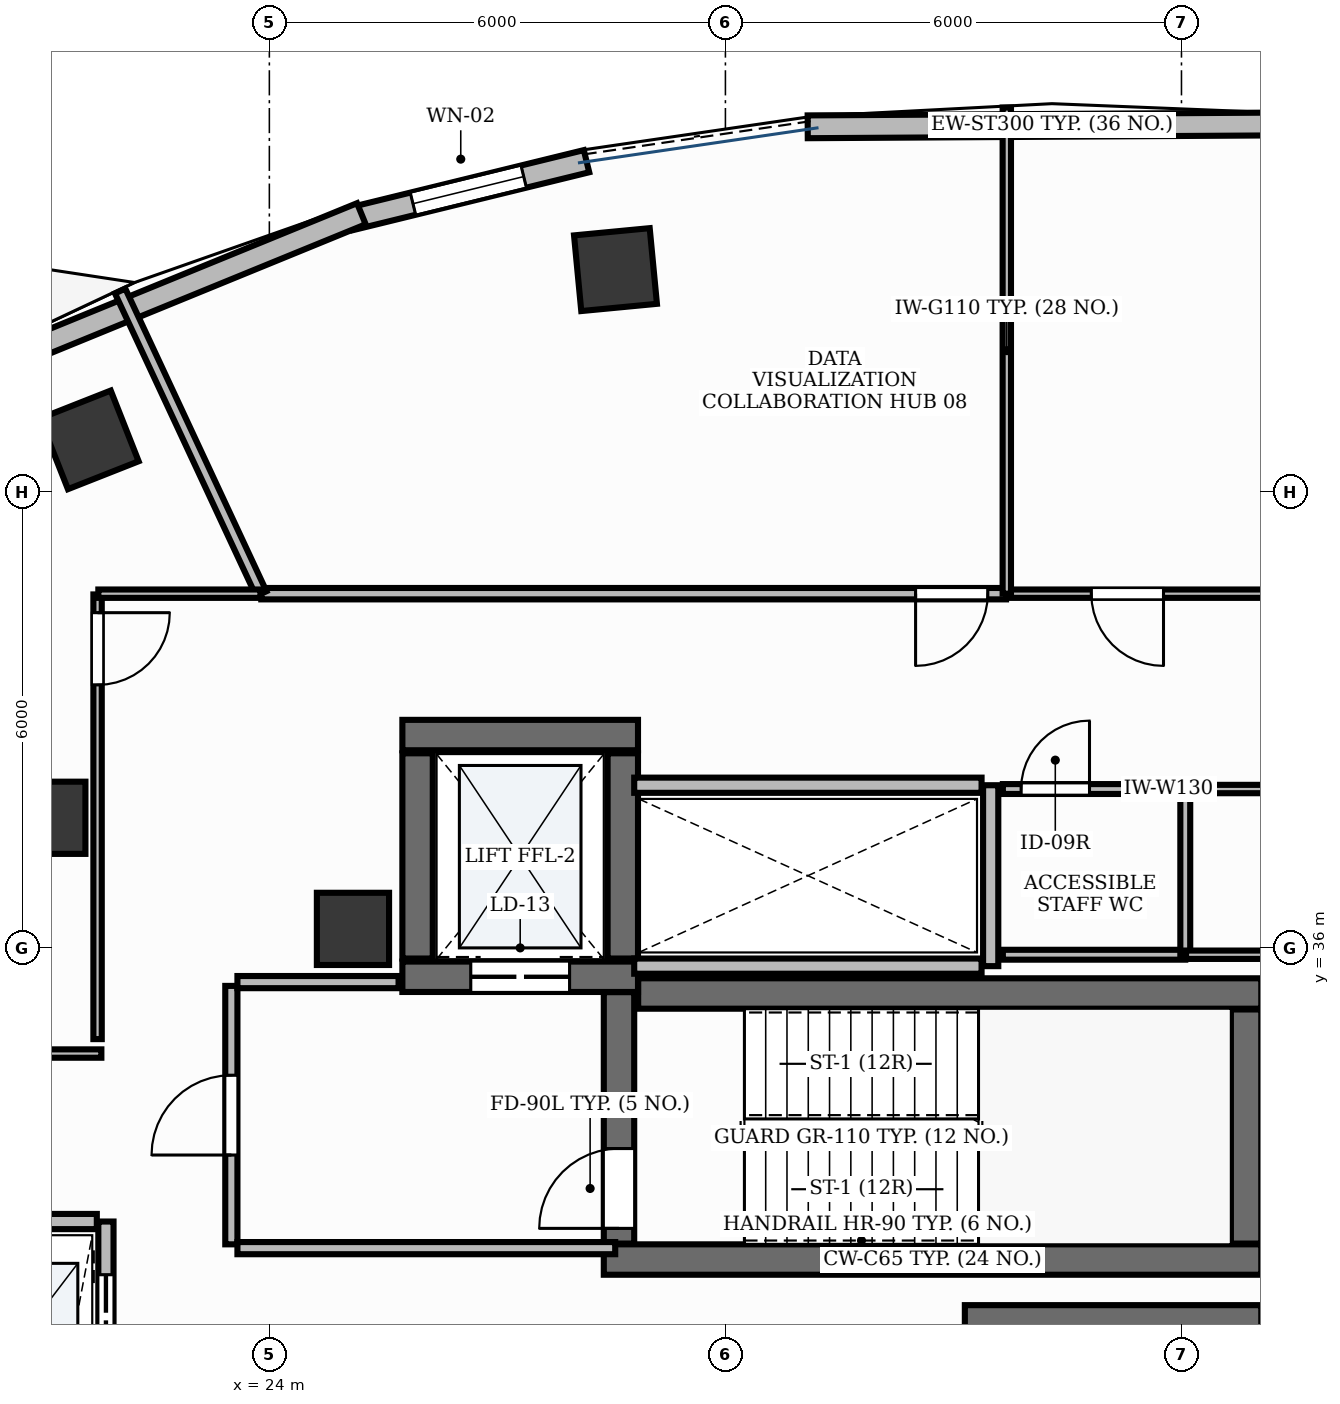
"""IFC4 building model, lengths in metres.
Left out: names, types, materials, properties, quantities, classifications, styles, units other than length and angle.
Written with IfcOpenShell. Run it as: python <this file> out.ifc"""

import sys

from ifc_helpers import new_model, si_unit, direction, frame, frame_2d, origin, origin_2d, place, context, subcontext, project, spatial, rectangle, extrude, element, fill, save


model = new_model("IFC4")
c1 = context("Model", 3, precision=1e-05, world=origin(), true_north=direction((0.0, 1.0)))
c2 = subcontext(c1, "Body", "Model", "MODEL_VIEW")
j1 = project(units=[si_unit("LENGTHUNIT", "METRE"), si_unit("PLANEANGLEUNIT", "RADIAN")], contexts=[c1])
p1 = place(None, origin())
s1 = spatial("IfcSite", under=j1, at=p1, CompositionType="ELEMENT")
p2 = place(p1, origin())
s2 = spatial("IfcBuilding", under=s1, at=p2, CompositionType="ELEMENT")
p3 = place(p2, frame((0.0, 0.0, 208.8)))
s3 = spatial("IfcBuildingStorey", under=s2, at=p3, CompositionType="ELEMENT", Elevation=208.8)
p4 = place(p3, frame((28.852, 35.4, 0.0), z_axis=(0.0, 0.0, 1.0), x_axis=(1.0, 0.0, 0.0)))
e1 = element("IfcWall", 1, at=p4, inside=s3, PredefinedType="SHEAR", context=c2, shape_type="SweptSolid", body=[
    extrude(rectangle(XDim=8.198, YDim=0.4, at=frame_2d((4.099, 0.0))), origin(), (0.0, 0.0, 1.0), 3.88),
])
p5 = place(p3, frame((28.4, 31.9, 0.0), z_axis=(0.0, 0.0, 1.0), x_axis=(1.0, 0.0, 0.0)))
e2 = element("IfcWall", 2, at=p5, inside=s3, PredefinedType="SHEAR", context=c2, shape_type="SweptSolid", body=[
    extrude(rectangle(XDim=8.65, YDim=0.4, at=frame_2d((4.325, 0.0))), origin(), (0.0, 0.0, 1.0), 3.88),
])
p6 = place(p3, frame((36.85, 32.11, 0.0), z_axis=(0.0, 0.0, 1.0), x_axis=(0.0, 1.0, 0.0)))
e3 = element("IfcWall", 3, at=p6, inside=s3, PredefinedType="SHEAR", context=c2, shape_type="SweptSolid", body=[
    extrude(rectangle(XDim=3.08, YDim=0.4, at=frame_2d((1.54, 0.0))), origin(), (0.0, 0.0, 1.0), 3.88),
])
p7 = place(p3, frame((28.6, 32.11, 0.0), z_axis=(0.0, 0.0, 1.0), x_axis=(0.0, 1.0, 0.0)))
e4 = element("IfcWall", 4, at=p7, inside=s3, PredefinedType="SHEAR", context=c2, shape_type="SweptSolid", body=[
    extrude(rectangle(XDim=3.308, YDim=0.4, at=frame_2d((1.654, 0.0))), origin(), (0.0, 0.0, 1.0), 3.88),
])
p8 = place(p7, frame((0.2, 0.0, 0.0)))
e5 = element("IfcOpeningElement", 5, at=p8, cuts=e4, PredefinedType="OPENING", context=c2, shape_type="SweptSolid", body=[
    extrude(rectangle(XDim=1.05, YDim=2.15, at=frame_2d((0.525, 1.075))), frame((0.0, 0.215, 0.0), z_axis=(0.0, -1.0, 0.0), x_axis=(1.0, 0.0, 0.0)), (0.0, 0.0, 1.0), 0.43),
])
p9 = place(p3, frame((33.15, 31.1, 0.0), z_axis=(0.0, 0.0, 1.0), x_axis=(1.0, 0.0, 0.0)))
e6 = element("IfcWall", 6, at=p9, inside=s3, PredefinedType="SHEAR", context=c2, shape_type="SweptSolid", body=[
    extrude(rectangle(XDim=3.9, YDim=0.4, at=frame_2d((1.95, 0.0))), origin(), (0.0, 0.0, 1.0), 3.88),
])
p10 = place(p3, frame((25.75, 38.8, 0.0), z_axis=(0.0, 0.0, 1.0), x_axis=(1.0, 0.0, 0.0)))
e7 = element("IfcWall", 7, at=p10, inside=s3, PredefinedType="SHEAR", context=c2, shape_type="SweptSolid", body=[
    extrude(rectangle(XDim=3.1, YDim=0.4, at=frame_2d((1.55, 0.0))), origin(), (0.0, 0.0, 1.0), 3.88),
])
p11 = place(p3, frame((25.75, 35.62, 0.0), z_axis=(0.0, 0.0, 1.0), x_axis=(1.0, 0.0, 0.0)))
e8 = element("IfcWall", 8, at=p11, inside=s3, PredefinedType="SHEAR", context=c2, shape_type="SweptSolid", body=[
    extrude(rectangle(XDim=3.1, YDim=0.4, at=frame_2d((1.55, 0.0))), origin(), (0.0, 0.0, 1.0), 3.88),
])
p12 = place(p11, frame((0.9, 0.0, 0.0)))
e9 = element("IfcOpeningElement", 9, at=p12, cuts=e8, PredefinedType="OPENING", context=c2, shape_type="SweptSolid", body=[
    extrude(rectangle(XDim=1.3, YDim=2.2, at=frame_2d((0.65, 1.1))), frame((0.0, 0.215, 0.0), z_axis=(0.0, -1.0, 0.0), x_axis=(1.0, 0.0, 0.0)), (0.0, 0.0, 1.0), 0.43),
])
for number, where, z_axis, x_axis in (
    (10, (25.95, 35.86, 0.0), (0.0, 0.0, 1.0), (0.0, 1.0, 0.0)),
    (11, (28.65, 35.86, 0.0), (0.0, 0.0, 1.0), (0.0, 1.0, 0.0)),
):
    element("IfcWall", number, at=place(p3, frame(where, z_axis=z_axis, x_axis=x_axis)), inside=s3, PredefinedType="SHEAR", context=c2, shape_type="SweptSolid", body=[
        extrude(rectangle(XDim=2.7, YDim=0.4, at=frame_2d((1.35, 0.0))), origin(), (0.0, 0.0, 1.0), 3.88),
    ])
p13 = place(p3, frame((25.1, 36.25, -0.0), z_axis=(0.0, 0.0, 1.0), x_axis=(1.0, 0.0, 0.0)))
e12 = element("IfcColumn", 12, at=p13, inside=s3, PredefinedType="PILASTER", context=c2, shape_type="SweptSolid", body=[
    extrude(rectangle(XDim=0.95, YDim=0.95, at=origin_2d()), origin(), (0.0, 0.0, 1.0), 3.881),
])
for number, where, z_axis, x_axis in (
    (13, (28.554, 44.924, -0.0), (0.0, 0.0, 1.0), (0.995, 0.095, 0.0)),
    (14, (21.632, 42.684, -0.0), (0.0, 0.0, 1.0), (0.93, 0.367, 0.0)),
):
    element("IfcColumn", number, at=place(p3, frame(where, z_axis=z_axis, x_axis=x_axis)), inside=s3, PredefinedType="COLUMN", context=c2, shape_type="SweptSolid", body=[
        extrude(rectangle(XDim=1.0, YDim=1.0, at=origin_2d()), origin(), (0.0, 0.0, 1.0), 3.881),
    ])
p14 = place(p3, frame((21.105, 37.712, -0.0), z_axis=(0.0, 0.0, 1.0), x_axis=(1.0, 0.0, 0.0)))
e15 = element("IfcColumn", 15, at=p14, inside=s3, PredefinedType="COLUMN", context=c2, shape_type="SweptSolid", body=[
    extrude(rectangle(XDim=0.95, YDim=0.95, at=origin_2d()), origin(), (0.0, 0.0, 1.0), 3.881),
])
p15 = place(p3, frame((28.173, 46.35, 0.0), z_axis=(0.0, 0.0, 1.0), x_axis=(-0.971262421812, -0.238011150948, 0.0)))
e16 = element("IfcWall", 16, at=p15, inside=s3, PredefinedType="STANDARD", context=c2, shape_type="SweptSolid", body=[
    extrude(rectangle(XDim=3.201, YDim=0.3, at=frame_2d((1.601, 0.0))), origin(), (0.0, 0.0, 1.0), 3.88),
])
p16 = place(p15, frame((0.851, 0.0, 0.95)))
e17 = element("IfcOpeningElement", 17, at=p16, cuts=e16, PredefinedType="OPENING", context=c2, shape_type="SweptSolid", body=[
    extrude(rectangle(XDim=1.5, YDim=1.8, at=frame_2d((0.75, 0.9))), frame((0.0, 0.165, 0.0), z_axis=(0.0, -1.0, 0.0), x_axis=(1.0, 0.0, 0.0)), (0.0, 0.0, 1.0), 0.33),
])
p17 = place(p3, frame((37.513, 46.841, 0.0), z_axis=(0.0, 0.0, 1.0), x_axis=(-0.999982235247, -0.005960636734, 0.0)))
e18 = element("IfcWall", 18, at=p17, inside=s3, PredefinedType="STANDARD", context=c2, shape_type="SweptSolid", body=[
    extrude(rectangle(XDim=6.43, YDim=0.3, at=frame_2d((3.215, 0.0))), origin(), (0.0, 0.0, 1.0), 3.88),
])
p18 = place(p3, frame((25.21, 45.658, 0.0), z_axis=(0.0, 0.0, 1.0), x_axis=(-0.925564684887, -0.37858950605, 0.0)))
e19 = element("IfcWall", 19, at=p18, inside=s3, PredefinedType="STANDARD", context=c2, shape_type="SweptSolid", body=[
    extrude(rectangle(XDim=6.142, YDim=0.3, at=frame_2d((3.071, 0.0))), origin(), (0.0, 0.0, 1.0), 2.205),
])
p19 = place(p3, frame((21.85, 21.6, 0.0), z_axis=(0.0, 0.0, 1.0), x_axis=(0.0, 1.0, 0.0)))
e20 = element("IfcWall", 20, at=p19, inside=s3, PredefinedType="PARTITIONING", context=c2, shape_type="SweptSolid", body=[
    extrude(rectangle(XDim=10.8, YDim=0.2, at=frame_2d((5.4, 0.0))), origin(), (0.0, 0.0, 1.0), 2.22),
])
p20 = place(p19, frame((0.9, 0.0, 0.0)))
e21 = element("IfcOpeningElement", 21, at=p20, cuts=e20, PredefinedType="OPENING", context=c2, shape_type="SweptSolid", body=[
    extrude(rectangle(XDim=1.1, YDim=2.2, at=frame_2d((0.55, 1.1))), frame((0.0, 0.115, 0.0), z_axis=(0.0, -1.0, 0.0), x_axis=(1.0, 0.0, 0.0)), (0.0, 0.0, 1.0), 0.23),
])
p21 = place(p19, frame((3.6, 0.0, 0.0)))
e22 = element("IfcOpeningElement", 22, at=p21, cuts=e20, PredefinedType="OPENING", context=c2, shape_type="SweptSolid", body=[
    extrude(rectangle(XDim=1.1, YDim=2.2, at=frame_2d((0.55, 1.1))), frame((0.0, 0.115, 0.0), z_axis=(0.0, -1.0, 0.0), x_axis=(1.0, 0.0, 0.0)), (0.0, 0.0, 1.0), 0.23),
])
p22 = place(p19, frame((6.3, 0.0, 0.0)))
e23 = element("IfcOpeningElement", 23, at=p22, cuts=e20, PredefinedType="OPENING", context=c2, shape_type="SweptSolid", body=[
    extrude(rectangle(XDim=1.1, YDim=2.2, at=frame_2d((0.55, 1.1))), frame((0.0, 0.115, 0.0), z_axis=(0.0, -1.0, 0.0), x_axis=(1.0, 0.0, 0.0)), (0.0, 0.0, 1.0), 0.23),
])
p23 = place(p19, frame((9.0, 0.0, 0.0)))
e24 = element("IfcOpeningElement", 24, at=p23, cuts=e20, PredefinedType="OPENING", context=c2, shape_type="SweptSolid", body=[
    extrude(rectangle(XDim=1.1, YDim=2.2, at=frame_2d((0.55, 1.1))), frame((0.0, 0.115, 0.0), z_axis=(0.0, -1.0, 0.0), x_axis=(1.0, 0.0, 0.0)), (0.0, 0.0, 1.0), 0.23),
])
p24 = place(p3, frame((19.62, 32.4, 0.0), z_axis=(0.0, 0.0, 1.0), x_axis=(1.0, 0.0, 0.0)))
e25 = element("IfcWall", 25, at=p24, inside=s3, PredefinedType="PARTITIONING", context=c2, shape_type="SweptSolid", body=[
    extrude(rectangle(XDim=2.11, YDim=0.2, at=frame_2d((1.055, 0.0))), origin(), (0.0, 0.0, 1.0), 2.22),
])
p25 = place(p3, frame((33.49, 35.76, 0.0), z_axis=(0.0, 0.0, 1.0), x_axis=(0.0, 1.0, 0.0)))
e26 = element("IfcWall", 26, at=p25, inside=s3, PredefinedType="PARTITIONING", context=c2, shape_type="SweptSolid", body=[
    extrude(rectangle(XDim=2.38, YDim=0.2, at=frame_2d((1.19, 0.0))), origin(), (0.0, 0.0, 1.0), 2.22),
])
for number, where, z_axis, x_axis in (
    (27, (28.8, 35.76, 0.0), (0.0, 0.0, 1.0), (1.0, 0.0, 0.0)),
    (28, (28.8, 38.14, 0.0), (0.0, 0.0, 1.0), (1.0, 0.0, 0.0)),
):
    element("IfcWall", number, at=place(p3, frame(where, z_axis=z_axis, x_axis=x_axis)), inside=s3, PredefinedType="PARTITIONING", context=c2, shape_type="SweptSolid", body=[
        extrude(rectangle(XDim=4.57, YDim=0.2, at=frame_2d((2.285, 0.0))), origin(), (0.0, 0.0, 1.0), 2.22),
    ])
p26 = place(p3, frame((23.5, 32.1, 0.0), z_axis=(0.0, 0.0, 1.0), x_axis=(0.0, 1.0, 0.0)))
e29 = element("IfcWall", 29, at=p26, inside=s3, PredefinedType="PARTITIONING", context=c2, shape_type="SweptSolid", body=[
    extrude(rectangle(XDim=3.4, YDim=0.16, at=frame_2d((1.7, 0.0))), origin(), (0.0, 0.0, 1.0), 2.22),
])
p27 = place(p26, frame((1.175, 0.0, 0.0)))
e30 = element("IfcOpeningElement", 30, at=p27, cuts=e29, PredefinedType="OPENING", context=c2, shape_type="SweptSolid", body=[
    extrude(rectangle(XDim=1.05, YDim=2.15, at=frame_2d((0.525, 1.075))), frame((0.0, 0.095, 0.0), z_axis=(0.0, -1.0, 0.0), x_axis=(1.0, 0.0, 0.0)), (0.0, 0.0, 1.0), 0.19),
])
p28 = place(p3, frame((23.58, 32.05, 0.0), z_axis=(0.0, 0.0, 1.0), x_axis=(1.0, 0.0, 0.0)))
e31 = element("IfcWall", 31, at=p28, inside=s3, PredefinedType="PARTITIONING", context=c2, shape_type="SweptSolid", body=[
    extrude(rectangle(XDim=4.97, YDim=0.16, at=frame_2d((2.485, 0.0))), origin(), (0.0, 0.0, 1.0), 2.22),
])
p29 = place(p3, frame((23.58, 35.55, 0.0), z_axis=(0.0, 0.0, 1.0), x_axis=(1.0, 0.0, 0.0)))
e32 = element("IfcWall", 32, at=p29, inside=s3, PredefinedType="PARTITIONING", context=c2, shape_type="SweptSolid", body=[
    extrude(rectangle(XDim=2.12, YDim=0.16, at=frame_2d((1.06, 0.0))), origin(), (0.0, 0.0, 1.0), 2.22),
])
p30 = place(p3, frame((33.65, 38.09, 0.0), z_axis=(0.0, 0.0, 1.0), x_axis=(1.0, 0.0, 0.0)))
e33 = element("IfcWall", 33, at=p30, inside=s3, PredefinedType="PARTITIONING", context=c2, shape_type="SweptSolid", body=[
    extrude(rectangle(XDim=2.4, YDim=0.13, at=frame_2d((1.2, 0.0))), origin(), (0.0, 0.0, 1.0), 2.22),
])
p31 = place(p30, frame((0.24, 0.0, 0.0)))
e34 = element("IfcOpeningElement", 34, at=p31, cuts=e33, PredefinedType="OPENING", context=c2, shape_type="SweptSolid", body=[
    extrude(rectangle(XDim=0.9, YDim=2.15, at=frame_2d((0.45, 1.075))), frame((0.0, 0.08, 0.0), z_axis=(0.0, -1.0, 0.0), x_axis=(1.0, 0.0, 0.0)), (0.0, 0.0, 1.0), 0.16),
])
p32 = place(p3, frame((37.2, 40.66, 0.0), z_axis=(0.0, 0.0, 1.0), x_axis=(-1.0, 0.0, 0.0)))
e35 = element("IfcWall", 35, at=p32, inside=s3, PredefinedType="MOVABLE", context=c2, shape_type="SweptSolid", body=[
    extrude(rectangle(XDim=3.498, YDim=0.11, at=frame_2d((1.749, 0.0))), origin(), (0.0, 0.0, 1.0), 2.22),
])
p33 = place(p32, frame((1.436, 0.0, 0.0)))
e36 = element("IfcOpeningElement", 36, at=p33, cuts=e35, PredefinedType="OPENING", context=c2, shape_type="SweptSolid", body=[
    extrude(rectangle(XDim=0.95, YDim=2.15, at=frame_2d((0.475, 1.075))), frame((0.0, 0.07, 0.0), z_axis=(0.0, -1.0, 0.0), x_axis=(1.0, 0.0, 0.0)), (0.0, 0.0, 1.0), 0.14),
])
p34 = place(p3, frame((33.692, 40.66, 0.0), z_axis=(0.0, 0.0, 1.0), x_axis=(-1.0, 0.0, 0.0)))
e37 = element("IfcWall", 37, at=p34, inside=s3, PredefinedType="PARTITIONING", context=c2, shape_type="SweptSolid", body=[
    extrude(rectangle(XDim=9.798, YDim=0.15, at=frame_2d((4.899, 0.0))), origin(), (0.0, 0.0, 1.0), 2.22),
])
p35 = place(p34, frame((0.24, 0.0, 0.0)))
e38 = element("IfcOpeningElement", 38, at=p35, cuts=e37, PredefinedType="OPENING", context=c2, shape_type="SweptSolid", body=[
    extrude(rectangle(XDim=0.95, YDim=2.15, at=frame_2d((0.475, 1.075))), frame((0.0, 0.09, 0.0), z_axis=(0.0, -1.0, 0.0), x_axis=(1.0, 0.0, 0.0)), (0.0, 0.0, 1.0), 0.18),
])
p36 = place(p3, frame((21.74, 40.65, 0.0), z_axis=(0.0, 0.0, 1.0), x_axis=(0.0, -1.0, 0.0)))
e39 = element("IfcWall", 39, at=p36, inside=s3, PredefinedType="MOVABLE", context=c2, shape_type="SweptSolid", body=[
    extrude(rectangle(XDim=5.85, YDim=0.11, at=frame_2d((2.925, 0.0))), origin(), (0.0, 0.0, 1.0), 2.22),
])
p37 = place(p36, frame((0.24, 0.0, 0.0)))
e40 = element("IfcOpeningElement", 40, at=p37, cuts=e39, PredefinedType="OPENING", context=c2, shape_type="SweptSolid", body=[
    extrude(rectangle(XDim=0.95, YDim=2.15, at=frame_2d((0.475, 1.075))), frame((0.0, 0.07, 0.0), z_axis=(0.0, -1.0, 0.0), x_axis=(1.0, 0.0, 0.0)), (0.0, 0.0, 1.0), 0.14),
])
p38 = place(p3, frame((36.05, 35.91, 0.0), z_axis=(0.0, 0.0, 1.0), x_axis=(-1.0, 0.0, 0.0)))
e41 = element("IfcWall", 41, at=p38, inside=s3, PredefinedType="PARTITIONING", context=c2, shape_type="SweptSolid", body=[
    extrude(rectangle(XDim=2.4, YDim=0.13, at=frame_2d((1.2, 0.0))), origin(), (0.0, 0.0, 1.0), 2.22),
])
p39 = place(p3, frame((36.05, 38.09, 0.0), z_axis=(0.0, 0.0, 1.0), x_axis=(0.0, -1.0, 0.0)))
e42 = element("IfcWall", 42, at=p39, inside=s3, PredefinedType="PARTITIONING", context=c2, shape_type="SweptSolid", body=[
    extrude(rectangle(XDim=2.18, YDim=0.13, at=frame_2d((1.09, 0.0))), origin(), (0.0, 0.0, 1.0), 2.22),
])
p40 = place(p3, frame((37.35, 35.91, 0.0), z_axis=(0.0, 0.0, 1.0), x_axis=(-1.0, 0.0, 0.0)))
e43 = element("IfcWall", 43, at=p40, inside=s3, PredefinedType="MOVABLE", context=c2, shape_type="SweptSolid", body=[
    extrude(rectangle(XDim=1.29, YDim=0.11, at=frame_2d((0.645, 0.0))), origin(), (0.0, 0.0, 1.0), 2.22),
])
p41 = place(p3, frame((36.06, 38.09, 0.0), z_axis=(0.0, 0.0, 1.0), x_axis=(1.0, 0.0, 0.0)))
e44 = element("IfcWall", 44, at=p41, inside=s3, PredefinedType="MOVABLE", context=c2, shape_type="SweptSolid", body=[
    extrude(rectangle(XDim=1.14, YDim=0.11, at=frame_2d((0.57, 0.0))), origin(), (0.0, 0.0, 1.0), 2.22),
])
p42 = place(p3, frame((33.702, 40.66, 0.0), z_axis=(0.0, 0.0, 1.0), x_axis=(0.0, 1.0, 0.0)))
e45 = element("IfcWall", 45, at=p42, inside=s3, PredefinedType="MOVABLE", context=c2, shape_type="SweptSolid", body=[
    extrude(rectangle(XDim=6.395, YDim=0.11, at=frame_2d((3.198, 0.0))), origin(), (0.0, 0.0, 1.0), 2.22),
])
p43 = place(p3, frame((23.894, 40.66, 0.0), z_axis=(0.0, 0.0, 1.0), x_axis=(-0.422620807898, 0.90630659974, 0.0)))
e46 = element("IfcWall", 46, at=p43, inside=s3, PredefinedType="PARTITIONING", context=c2, shape_type="SweptSolid", body=[
    extrude(rectangle(XDim=4.394, YDim=0.15, at=frame_2d((2.197, 0.0))), origin(), (0.0, 0.0, 1.0), 2.22),
])
p44 = place(p3, frame((23.883, 40.66, 0.0), z_axis=(0.0, 0.0, 1.0), x_axis=(-1.0, 0.0, 0.0)))
e47 = element("IfcWall", 47, at=p44, inside=s3, PredefinedType="MOVABLE", context=c2, shape_type="SweptSolid", body=[
    extrude(rectangle(XDim=2.133, YDim=0.11, at=frame_2d((1.066, 0.0))), origin(), (0.0, 0.0, 1.0), 2.22),
])
p45 = place(p3, frame((21.79, 34.61, 0.0), z_axis=(0.0, 0.0, 1.0), x_axis=(-1.0, 0.0, 0.0)))
e48 = element("IfcWall", 48, at=p45, inside=s3, PredefinedType="MOVABLE", context=c2, shape_type="SweptSolid", body=[
    extrude(rectangle(XDim=4.18, YDim=0.11, at=frame_2d((2.09, 0.0))), origin(), (0.0, 0.0, 1.0), 2.22),
])
p46 = place(p16, origin())
e49 = element("IfcWindow", 49, at=p46, inside=s3, PartitioningType="DOUBLE_PANEL_VERTICAL", PredefinedType="WINDOW", context=c2, shape_type="SweptSolid", body=[
    extrude(rectangle(XDim=1.5, YDim=1.8, at=frame_2d((0.75, 0.9))), frame((0.0, 0.03, 0.0), z_axis=(0.0, -1.0, 0.0), x_axis=(1.0, 0.0, 0.0)), (0.0, 0.0, 1.0), 0.06),
])
fill(e17, e49)
p47 = place(p8, origin())
e50 = element("IfcDoor", 50, at=p47, inside=s3, OperationType="SINGLE_SWING_LEFT", PredefinedType="DOOR", context=c2, shape_type="SweptSolid", body=[
    extrude(rectangle(XDim=1.05, YDim=2.15, at=frame_2d((0.525, 1.075))), frame((0.0, 0.025, 0.0), z_axis=(0.0, -1.0, 0.0), x_axis=(1.0, 0.0, 0.0)), (0.0, 0.0, 1.0), 0.05),
])
fill(e5, e50)
p48 = place(p23, origin())
e51 = element("IfcDoor", 51, at=p48, inside=s3, OperationType="DOUBLE_DOOR_SLIDING", PredefinedType="DOOR", context=c2, shape_type="SweptSolid", body=[
    extrude(rectangle(XDim=1.1, YDim=2.2, at=frame_2d((0.55, 1.1))), frame((0.0, 0.025, 0.0), z_axis=(0.0, -1.0, 0.0), x_axis=(1.0, 0.0, 0.0)), (0.0, 0.0, 1.0), 0.05),
])
fill(e24, e51)
p49 = place(p12, origin())
e52 = element("IfcDoor", 52, at=p49, inside=s3, OperationType="DOUBLE_DOOR_SLIDING", PredefinedType="DOOR", context=c2, shape_type="SweptSolid", body=[
    extrude(rectangle(XDim=1.3, YDim=2.2, at=frame_2d((0.65, 1.1))), frame((0.0, 0.025, 0.0), z_axis=(0.0, -1.0, 0.0), x_axis=(1.0, 0.0, 0.0)), (0.0, 0.0, 1.0), 0.05),
])
fill(e9, e52)
p50 = place(p27, origin())
e53 = element("IfcDoor", 53, at=p50, inside=s3, OperationType="SINGLE_SWING_LEFT", PredefinedType="DOOR", context=c2, shape_type="SweptSolid", body=[
    extrude(rectangle(XDim=1.05, YDim=2.15, at=frame_2d((0.525, 1.075))), frame((0.0, 0.025, 0.0), z_axis=(0.0, -1.0, 0.0), x_axis=(1.0, 0.0, 0.0)), (0.0, 0.0, 1.0), 0.05),
])
fill(e30, e53)
p51 = place(p31, origin())
e54 = element("IfcDoor", 54, at=p51, inside=s3, OperationType="SINGLE_SWING_RIGHT", PredefinedType="DOOR", context=c2, shape_type="SweptSolid", body=[
    extrude(rectangle(XDim=0.9, YDim=2.15, at=frame_2d((0.45, 1.075))), frame((0.0, 0.025, 0.0), z_axis=(0.0, -1.0, 0.0), x_axis=(1.0, 0.0, 0.0)), (0.0, 0.0, 1.0), 0.05),
])
fill(e34, e54)
p52 = place(p33, origin())
e55 = element("IfcDoor", 55, at=p52, inside=s3, OperationType="SINGLE_SWING_LEFT", PredefinedType="DOOR", context=c2, shape_type="SweptSolid", body=[
    extrude(rectangle(XDim=0.95, YDim=2.15, at=frame_2d((0.475, 1.075))), frame((0.0, 0.025, 0.0), z_axis=(0.0, -1.0, 0.0), x_axis=(1.0, 0.0, 0.0)), (0.0, 0.0, 1.0), 0.05),
])
fill(e36, e55)
p53 = place(p35, origin())
e56 = element("IfcDoor", 56, at=p53, inside=s3, OperationType="SINGLE_SWING_RIGHT", PredefinedType="DOOR", context=c2, shape_type="SweptSolid", body=[
    extrude(rectangle(XDim=0.95, YDim=2.15, at=frame_2d((0.475, 1.075))), frame((0.0, 0.025, 0.0), z_axis=(0.0, -1.0, 0.0), x_axis=(1.0, 0.0, 0.0)), (0.0, 0.0, 1.0), 0.05),
])
fill(e38, e56)
p54 = place(p37, origin())
e57 = element("IfcDoor", 57, at=p54, inside=s3, OperationType="SINGLE_SWING_LEFT", PredefinedType="DOOR", context=c2, shape_type="SweptSolid", body=[
    extrude(rectangle(XDim=0.95, YDim=2.15, at=frame_2d((0.475, 1.075))), frame((0.0, 0.025, 0.0), z_axis=(0.0, -1.0, 0.0), x_axis=(1.0, 0.0, 0.0)), (0.0, 0.0, 1.0), 0.05),
])
fill(e40, e57)
save(model, sys.argv[1])
